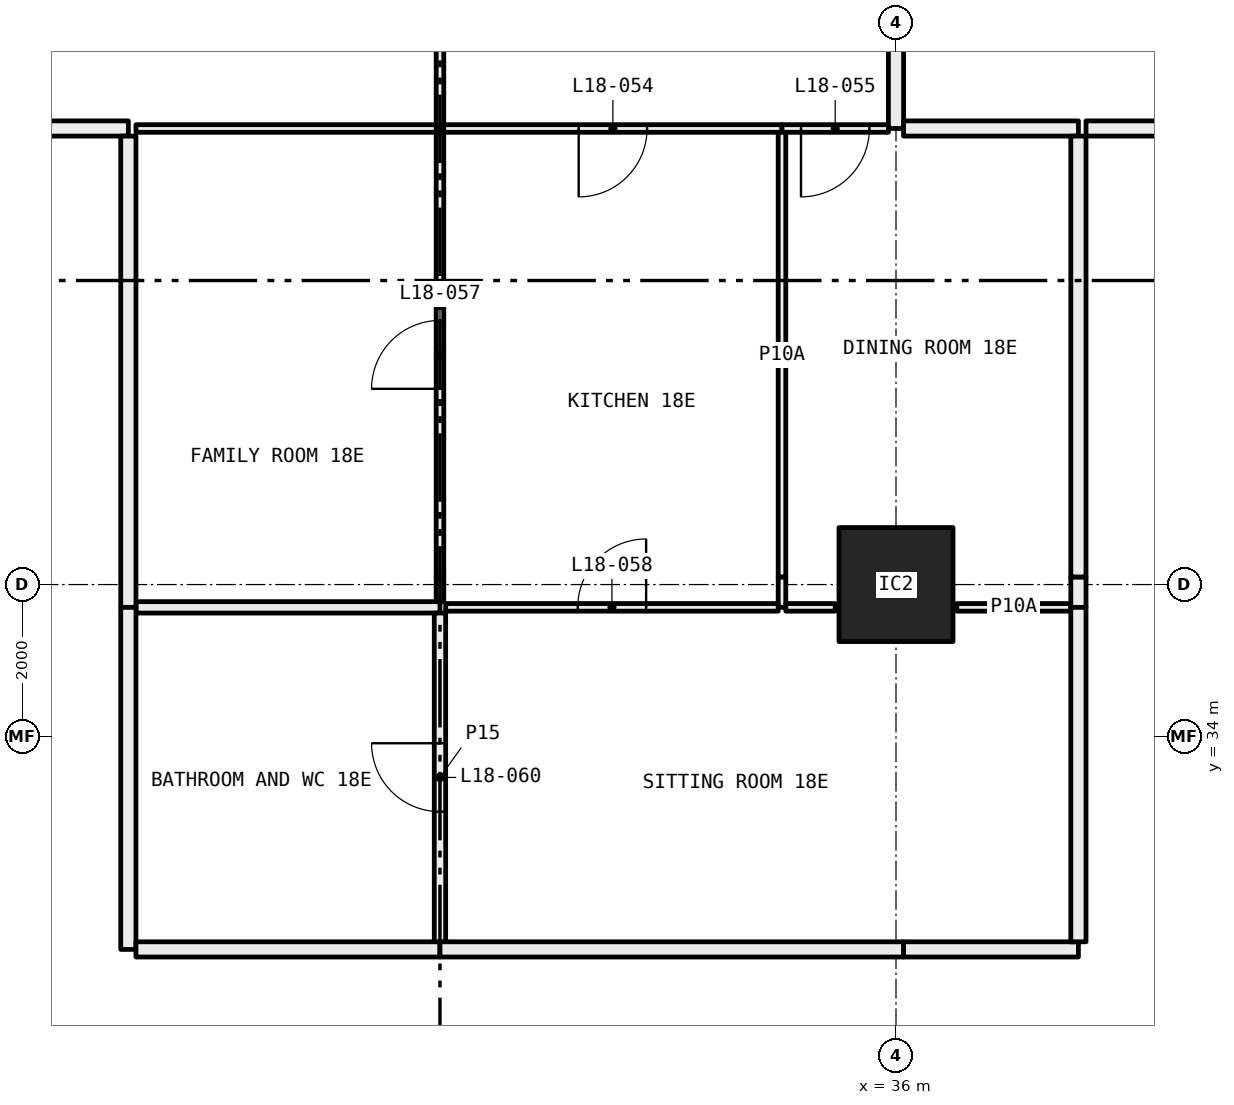
"""IFC4 building model, lengths in metres.
Left out: names, types, materials, properties, quantities, classifications, styles, units other than length and angle.
Written with IfcOpenShell. Run it as: python <this file> out.ifc"""

import sys

from ifc_helpers import new_model, si_unit, direction, frame, frame_2d, origin, origin_2d, place, context, subcontext, project, spatial, rectangle, hollow_rectangle, extrude, element, fill, save


model = new_model("IFC4")
c1 = context("Model", 3, precision=1e-05, world=origin(), true_north=direction((0.0, 1.0)))
c2 = subcontext(c1, "Body", "Model", "MODEL_VIEW")
j1 = project(units=[si_unit("LENGTHUNIT", "METRE"), si_unit("PLANEANGLEUNIT", "RADIAN")], contexts=[c1])
p1 = place(None, origin())
s1 = spatial("IfcSite", under=j1, at=p1, CompositionType="ELEMENT")
p2 = place(p1, origin())
s2 = spatial("IfcBuilding", under=s1, at=p2, CompositionType="ELEMENT")
p3 = place(p2, frame((0.0, 0.0, 74.85)))
s3 = spatial("IfcBuildingStorey", under=s2, at=p3, CompositionType="ELEMENT", Elevation=74.85)
p4 = place(p3, frame((36.0, 36.0, 0.0), z_axis=(0.0, 0.0, 1.0), x_axis=(1.0, 0.0, 0.0)))
e1 = element("IfcColumn", 1, at=p4, inside=s3, PredefinedType="COLUMN", context=c2, shape_type="SweptSolid", body=[
    extrude(hollow_rectangle(XDim=1.5, YDim=1.5, WallThickness=0.065, at=origin_2d()), origin(), (0.0, 0.0, 1.0), 3.05),
])
p5 = place(p3, frame((30.0, 42.0, 0.0), z_axis=(0.0, 0.0, 1.0), x_axis=(0.0, 1.0, 0.0)))
e2 = element("IfcWall", 2, at=p5, inside=s3, PredefinedType="PARTITIONING", context=c2, shape_type="SweptSolid", body=[
    extrude(rectangle(XDim=5.28, YDim=0.1, at=frame_2d((2.64, 0.0))), origin(), (0.0, 0.0, 1.0), 3.05),
])
p6 = place(p5, frame((2.19, 0.0, 0.0)))
e3 = element("IfcOpeningElement", 3, at=p6, cuts=e2, PredefinedType="OPENING", context=c2, shape_type="SweptSolid", body=[
    extrude(rectangle(XDim=0.9, YDim=2.1, at=frame_2d((0.45, 1.05))), frame((0.0, 0.06, 0.0), z_axis=(0.0, -1.0, 0.0), x_axis=(1.0, 0.0, 0.0)), (0.0, 0.0, 1.0), 0.12),
])
p7 = place(p3, frame((26.0, 42.0, 0.0), z_axis=(0.0, 0.0, 1.0), x_axis=(1.0, 0.0, 0.0)))
e4 = element("IfcWall", 4, at=p7, inside=s3, PredefinedType="PARTITIONING", context=c2, shape_type="SweptSolid", body=[
    extrude(rectangle(XDim=3.95, YDim=0.1, at=frame_2d((1.975, 0.0))), origin(), (0.0, 0.0, 1.0), 3.05),
])
p8 = place(p3, frame((24.0, 42.0, 0.0), z_axis=(0.0, 0.0, 1.0), x_axis=(1.0, 0.0, 0.0)))
e5 = element("IfcWall", 5, at=p8, inside=s3, PredefinedType="PARTITIONING", context=c2, shape_type="SweptSolid", body=[
    extrude(rectangle(XDim=1.9, YDim=0.2, at=frame_2d((0.95, 0.0))), origin(), (0.0, 0.0, 1.0), 3.05),
])
p9 = place(p3, frame((30.05, 42.0, 0.0), z_axis=(0.0, 0.0, 1.0), x_axis=(1.0, 0.0, 0.0)))
e6 = element("IfcWall", 6, at=p9, inside=s3, PredefinedType="PARTITIONING", context=c2, shape_type="SweptSolid", body=[
    extrude(rectangle(XDim=4.45, YDim=0.1, at=frame_2d((2.225, 0.0))), origin(), (0.0, 0.0, 1.0), 3.05),
])
p10 = place(p9, frame((1.775, 0.0, 0.0)))
e7 = element("IfcOpeningElement", 7, at=p10, cuts=e6, PredefinedType="OPENING", context=c2, shape_type="SweptSolid", body=[
    extrude(rectangle(XDim=0.9, YDim=2.1, at=frame_2d((0.45, 1.05))), frame((0.0, 0.06, 0.0), z_axis=(0.0, -1.0, 0.0), x_axis=(1.0, 0.0, 0.0)), (0.0, 0.0, 1.0), 0.12),
])
p11 = place(p3, frame((34.5, 42.0, 0.0), z_axis=(0.0, 0.0, 1.0), x_axis=(1.0, 0.0, 0.0)))
e8 = element("IfcWall", 8, at=p11, inside=s3, PredefinedType="PARTITIONING", context=c2, shape_type="SweptSolid", body=[
    extrude(rectangle(XDim=1.4, YDim=0.1, at=frame_2d((0.7, 0.0))), origin(), (0.0, 0.0, 1.0), 3.05),
])
p12 = place(p11, frame((0.25, 0.0, 0.0)))
e9 = element("IfcOpeningElement", 9, at=p12, cuts=e8, PredefinedType="OPENING", context=c2, shape_type="SweptSolid", body=[
    extrude(rectangle(XDim=0.9, YDim=2.1, at=frame_2d((0.45, 1.05))), frame((0.0, 0.06, 0.0), z_axis=(0.0, -1.0, 0.0), x_axis=(1.0, 0.0, 0.0)), (0.0, 0.0, 1.0), 0.12),
])
p13 = place(p3, frame((36.0, 42.0, 0.0), z_axis=(0.0, 0.0, 1.0), x_axis=(0.0, 1.0, 0.0)))
e10 = element("IfcWall", 10, at=p13, inside=s3, PredefinedType="PARTITIONING", context=c2, shape_type="SweptSolid", body=[
    extrude(rectangle(XDim=3.0, YDim=0.2, at=frame_2d((1.5, 0.0))), origin(), (0.0, 0.0, 1.0), 2.45),
])
p14 = place(p3, frame((30.0, 35.775, 0.0), z_axis=(0.0, 0.0, 1.0), x_axis=(0.0, 1.0, 0.0)))
e11 = element("IfcWall", 11, at=p14, inside=s3, PredefinedType="PARTITIONING", context=c2, shape_type="SweptSolid", body=[
    extrude(rectangle(XDim=0.325, YDim=0.1, at=frame_2d((0.163, 0.0))), origin(), (0.0, 0.0, 1.0), 2.45),
])
p15 = place(p3, frame((30.0, 36.1, 0.0), z_axis=(0.0, 0.0, 1.0), x_axis=(0.0, 1.0, 0.0)))
e12 = element("IfcWall", 12, at=p15, inside=s3, PredefinedType="PARTITIONING", context=c2, shape_type="SweptSolid", body=[
    extrude(rectangle(XDim=5.85, YDim=0.1, at=frame_2d((2.925, 0.0))), origin(), (0.0, 0.0, 1.0), 3.05),
])
p16 = place(p15, frame((2.475, 0.0, 0.0)))
e13 = element("IfcOpeningElement", 13, at=p16, cuts=e12, PredefinedType="OPENING", context=c2, shape_type="SweptSolid", body=[
    extrude(rectangle(XDim=0.9, YDim=2.1, at=frame_2d((0.45, 1.05))), frame((0.0, 0.06, 0.0), z_axis=(0.0, -1.0, 0.0), x_axis=(1.0, 0.0, 0.0)), (0.0, 0.0, 1.0), 0.12),
])
p17 = place(p3, frame((26.0, 35.7, 0.0), z_axis=(0.0, 0.0, 1.0), x_axis=(1.0, 0.0, 0.0)))
e14 = element("IfcWall", 14, at=p17, inside=s3, PredefinedType="PARTITIONING", context=c2, shape_type="SweptSolid", body=[
    extrude(rectangle(XDim=4.0, YDim=0.15, at=frame_2d((2.0, 0.0))), origin(), (0.0, 0.0, 1.0), 3.05),
])
p18 = place(p3, frame((25.9, 41.9, 0.0), z_axis=(0.0, 0.0, 1.0), x_axis=(0.0, -1.0, 0.0)))
e15 = element("IfcWall", 15, at=p18, inside=s3, PredefinedType="PARTITIONING", context=c2, shape_type="SweptSolid", body=[
    extrude(rectangle(XDim=6.2, YDim=0.2, at=frame_2d((3.1, 0.0))), origin(), (0.0, 0.0, 1.0), 2.45),
])
p19 = place(p3, frame((34.5, 35.7, 0.0), z_axis=(0.0, 0.0, 1.0), x_axis=(0.0, 1.0, 0.0)))
e16 = element("IfcWall", 16, at=p19, inside=s3, PredefinedType="PARTITIONING", context=c2, shape_type="SweptSolid", body=[
    extrude(rectangle(XDim=0.4, YDim=0.1, at=frame_2d((0.2, 0.0))), origin(), (0.0, 0.0, 1.0), 2.45),
])
p20 = place(p3, frame((34.5, 36.1, 0.0), z_axis=(0.0, 0.0, 1.0), x_axis=(0.0, 1.0, 0.0)))
e17 = element("IfcWall", 17, at=p20, inside=s3, PredefinedType="PARTITIONING", context=c2, shape_type="SweptSolid", body=[
    extrude(rectangle(XDim=5.85, YDim=0.1, at=frame_2d((2.925, 0.0))), origin(), (0.0, 0.0, 1.0), 3.05),
])
p21 = place(p3, frame((30.075, 35.7, 0.0), z_axis=(0.0, 0.0, 1.0), x_axis=(1.0, 0.0, 0.0)))
e18 = element("IfcWall", 18, at=p21, inside=s3, PredefinedType="PARTITIONING", context=c2, shape_type="SweptSolid", body=[
    extrude(rectangle(XDim=4.375, YDim=0.1, at=frame_2d((2.188, 0.0))), origin(), (0.0, 0.0, 1.0), 3.05),
])
p22 = place(p21, frame((1.738, 0.0, 0.0)))
e19 = element("IfcOpeningElement", 19, at=p22, cuts=e18, PredefinedType="OPENING", context=c2, shape_type="SweptSolid", body=[
    extrude(rectangle(XDim=0.9, YDim=2.1, at=frame_2d((0.45, 1.05))), frame((0.0, 0.06, 0.0), z_axis=(0.0, -1.0, 0.0), x_axis=(1.0, 0.0, 0.0)), (0.0, 0.0, 1.0), 0.12),
])
p23 = place(p3, frame((34.55, 35.7, 0.0), z_axis=(0.0, 0.0, 1.0), x_axis=(1.0, 0.0, 0.0)))
e20 = element("IfcWall", 20, at=p23, inside=s3, PredefinedType="PARTITIONING", context=c2, shape_type="SweptSolid", body=[
    extrude(rectangle(XDim=0.65, YDim=0.1, at=frame_2d((0.325, 0.0))), origin(), (0.0, 0.0, 1.0), 3.05),
])
p24 = place(p3, frame((36.8, 35.7, 0.0), z_axis=(0.0, 0.0, 1.0), x_axis=(1.0, 0.0, 0.0)))
e21 = element("IfcWall", 21, at=p24, inside=s3, PredefinedType="PARTITIONING", context=c2, shape_type="SweptSolid", body=[
    extrude(rectangle(XDim=1.5, YDim=0.1, at=frame_2d((0.75, 0.0))), origin(), (0.0, 0.0, 1.0), 3.05),
])
p25 = place(p3, frame((38.4, 42.0, 0.0), z_axis=(0.0, 0.0, 1.0), x_axis=(-1.0, 0.0, 0.0)))
e22 = element("IfcWall", 22, at=p25, inside=s3, PredefinedType="PARTITIONING", context=c2, shape_type="SweptSolid", body=[
    extrude(rectangle(XDim=2.3, YDim=0.2, at=frame_2d((1.15, 0.0))), origin(), (0.0, 0.0, 1.0), 3.05),
])
p26 = place(p3, frame((38.4, 35.7, 0.0), z_axis=(0.0, 0.0, 1.0), x_axis=(0.0, 1.0, 0.0)))
e23 = element("IfcWall", 23, at=p26, inside=s3, PredefinedType="PARTITIONING", context=c2, shape_type="SweptSolid", body=[
    extrude(rectangle(XDim=0.4, YDim=0.2, at=frame_2d((0.2, 0.0))), origin(), (0.0, 0.0, 1.0), 2.45),
])
p27 = place(p3, frame((38.4, 36.1, 0.0), z_axis=(0.0, 0.0, 1.0), x_axis=(0.0, 1.0, 0.0)))
e24 = element("IfcWall", 24, at=p27, inside=s3, PredefinedType="PARTITIONING", context=c2, shape_type="SweptSolid", body=[
    extrude(rectangle(XDim=5.8, YDim=0.2, at=frame_2d((2.9, 0.0))), origin(), (0.0, 0.0, 1.0), 3.05),
])
p28 = place(p3, frame((30.0, 31.3, 0.0), z_axis=(0.0, 0.0, 1.0), x_axis=(0.0, 1.0, 0.0)))
e25 = element("IfcWall", 25, at=p28, inside=s3, PredefinedType="PARTITIONING", context=c2, shape_type="SweptSolid", body=[
    extrude(rectangle(XDim=4.325, YDim=0.15, at=frame_2d((2.163, 0.0))), origin(), (0.0, 0.0, 1.0), 3.05),
])
p29 = place(p28, frame((1.712, 0.0, 0.0)))
e26 = element("IfcOpeningElement", 26, at=p29, cuts=e25, PredefinedType="OPENING", context=c2, shape_type="SweptSolid", body=[
    extrude(rectangle(XDim=0.9, YDim=2.1, at=frame_2d((0.45, 1.05))), frame((0.0, 0.085, 0.0), z_axis=(0.0, -1.0, 0.0), x_axis=(1.0, 0.0, 0.0)), (0.0, 0.0, 1.0), 0.17),
])
p30 = place(p3, frame((25.9, 35.7, 0.0), z_axis=(0.0, 0.0, 1.0), x_axis=(0.0, -1.0, 0.0)))
e27 = element("IfcWall", 27, at=p30, inside=s3, PredefinedType="PARTITIONING", context=c2, shape_type="SweptSolid", body=[
    extrude(rectangle(XDim=4.5, YDim=0.2, at=frame_2d((2.25, 0.0))), origin(), (0.0, 0.0, 1.0), 3.05),
])
p31 = place(p3, frame((26.0, 31.2, 0.0), z_axis=(0.0, 0.0, 1.0), x_axis=(1.0, 0.0, 0.0)))
e28 = element("IfcWall", 28, at=p31, inside=s3, PredefinedType="PARTITIONING", context=c2, shape_type="SweptSolid", body=[
    extrude(rectangle(XDim=4.0, YDim=0.2, at=frame_2d((2.0, 0.0))), origin(), (0.0, 0.0, 1.0), 3.05),
])
p32 = place(p3, frame((30.0, 31.2, 0.0), z_axis=(0.0, 0.0, 1.0), x_axis=(1.0, 0.0, 0.0)))
e29 = element("IfcWall", 29, at=p32, inside=s3, PredefinedType="PARTITIONING", context=c2, shape_type="SweptSolid", body=[
    extrude(rectangle(XDim=6.1, YDim=0.2, at=frame_2d((3.05, 0.0))), origin(), (0.0, 0.0, 1.0), 2.45),
])
p33 = place(p3, frame((36.1, 31.2, 0.0), z_axis=(0.0, 0.0, 1.0), x_axis=(1.0, 0.0, 0.0)))
e30 = element("IfcWall", 30, at=p33, inside=s3, PredefinedType="PARTITIONING", context=c2, shape_type="SweptSolid", body=[
    extrude(rectangle(XDim=2.3, YDim=0.2, at=frame_2d((1.15, 0.0))), origin(), (0.0, 0.0, 1.0), 3.05),
])
p34 = place(p3, frame((38.4, 31.3, 0.0), z_axis=(0.0, 0.0, 1.0), x_axis=(0.0, 1.0, 0.0)))
e31 = element("IfcWall", 31, at=p34, inside=s3, PredefinedType="PARTITIONING", context=c2, shape_type="SweptSolid", body=[
    extrude(rectangle(XDim=4.4, YDim=0.2, at=frame_2d((2.2, 0.0))), origin(), (0.0, 0.0, 1.0), 3.05),
])
p35 = place(p3, frame((38.5, 42.0, 0.0), z_axis=(0.0, 0.0, 1.0), x_axis=(1.0, 0.0, 0.0)))
e32 = element("IfcWall", 32, at=p35, inside=s3, PredefinedType="PARTITIONING", context=c2, shape_type="SweptSolid", body=[
    extrude(rectangle(XDim=2.3, YDim=0.2, at=frame_2d((1.15, 0.0))), origin(), (0.0, 0.0, 1.0), 3.05),
])
p36 = place(p10, frame((0.9, 0.0, 0.0), x_axis=(-1.0, 0.0, 0.0)))
e33 = element("IfcDoor", 33, at=p36, inside=s3, OperationType="SINGLE_SWING_LEFT", PredefinedType="DOOR", context=c2, shape_type="SweptSolid", body=[
    extrude(rectangle(XDim=0.9, YDim=2.1, at=frame_2d((0.45, 1.05))), frame((0.0, 0.025, 0.0), z_axis=(0.0, -1.0, 0.0), x_axis=(1.0, 0.0, 0.0)), (0.0, 0.0, 1.0), 0.05),
])
fill(e7, e33)
p37 = place(p12, frame((0.9, 0.0, 0.0), x_axis=(-1.0, 0.0, 0.0)))
e34 = element("IfcDoor", 34, at=p37, inside=s3, OperationType="SINGLE_SWING_LEFT", PredefinedType="DOOR", context=c2, shape_type="SweptSolid", body=[
    extrude(rectangle(XDim=0.9, YDim=2.1, at=frame_2d((0.45, 1.05))), frame((0.0, 0.025, 0.0), z_axis=(0.0, -1.0, 0.0), x_axis=(1.0, 0.0, 0.0)), (0.0, 0.0, 1.0), 0.05),
])
fill(e9, e34)
p38 = place(p16, origin())
e35 = element("IfcDoor", 35, at=p38, inside=s3, OperationType="SINGLE_SWING_RIGHT", PredefinedType="DOOR", context=c2, shape_type="SweptSolid", body=[
    extrude(rectangle(XDim=0.9, YDim=2.1, at=frame_2d((0.45, 1.05))), frame((0.0, 0.025, 0.0), z_axis=(0.0, -1.0, 0.0), x_axis=(1.0, 0.0, 0.0)), (0.0, 0.0, 1.0), 0.05),
])
fill(e13, e35)
p39 = place(p22, origin())
e36 = element("IfcDoor", 36, at=p39, inside=s3, OperationType="SINGLE_SWING_LEFT", PredefinedType="DOOR", context=c2, shape_type="SweptSolid", body=[
    extrude(rectangle(XDim=0.9, YDim=2.1, at=frame_2d((0.45, 1.05))), frame((0.0, 0.025, 0.0), z_axis=(0.0, -1.0, 0.0), x_axis=(1.0, 0.0, 0.0)), (0.0, 0.0, 1.0), 0.05),
])
fill(e19, e36)
p40 = place(p29, origin())
e37 = element("IfcDoor", 37, at=p40, inside=s3, OperationType="SINGLE_SWING_LEFT", PredefinedType="DOOR", context=c2, shape_type="SweptSolid", body=[
    extrude(rectangle(XDim=0.9, YDim=2.1, at=frame_2d((0.45, 1.05))), frame((0.0, 0.025, 0.0), z_axis=(0.0, -1.0, 0.0), x_axis=(1.0, 0.0, 0.0)), (0.0, 0.0, 1.0), 0.05),
])
fill(e26, e37)
save(model, sys.argv[1])
